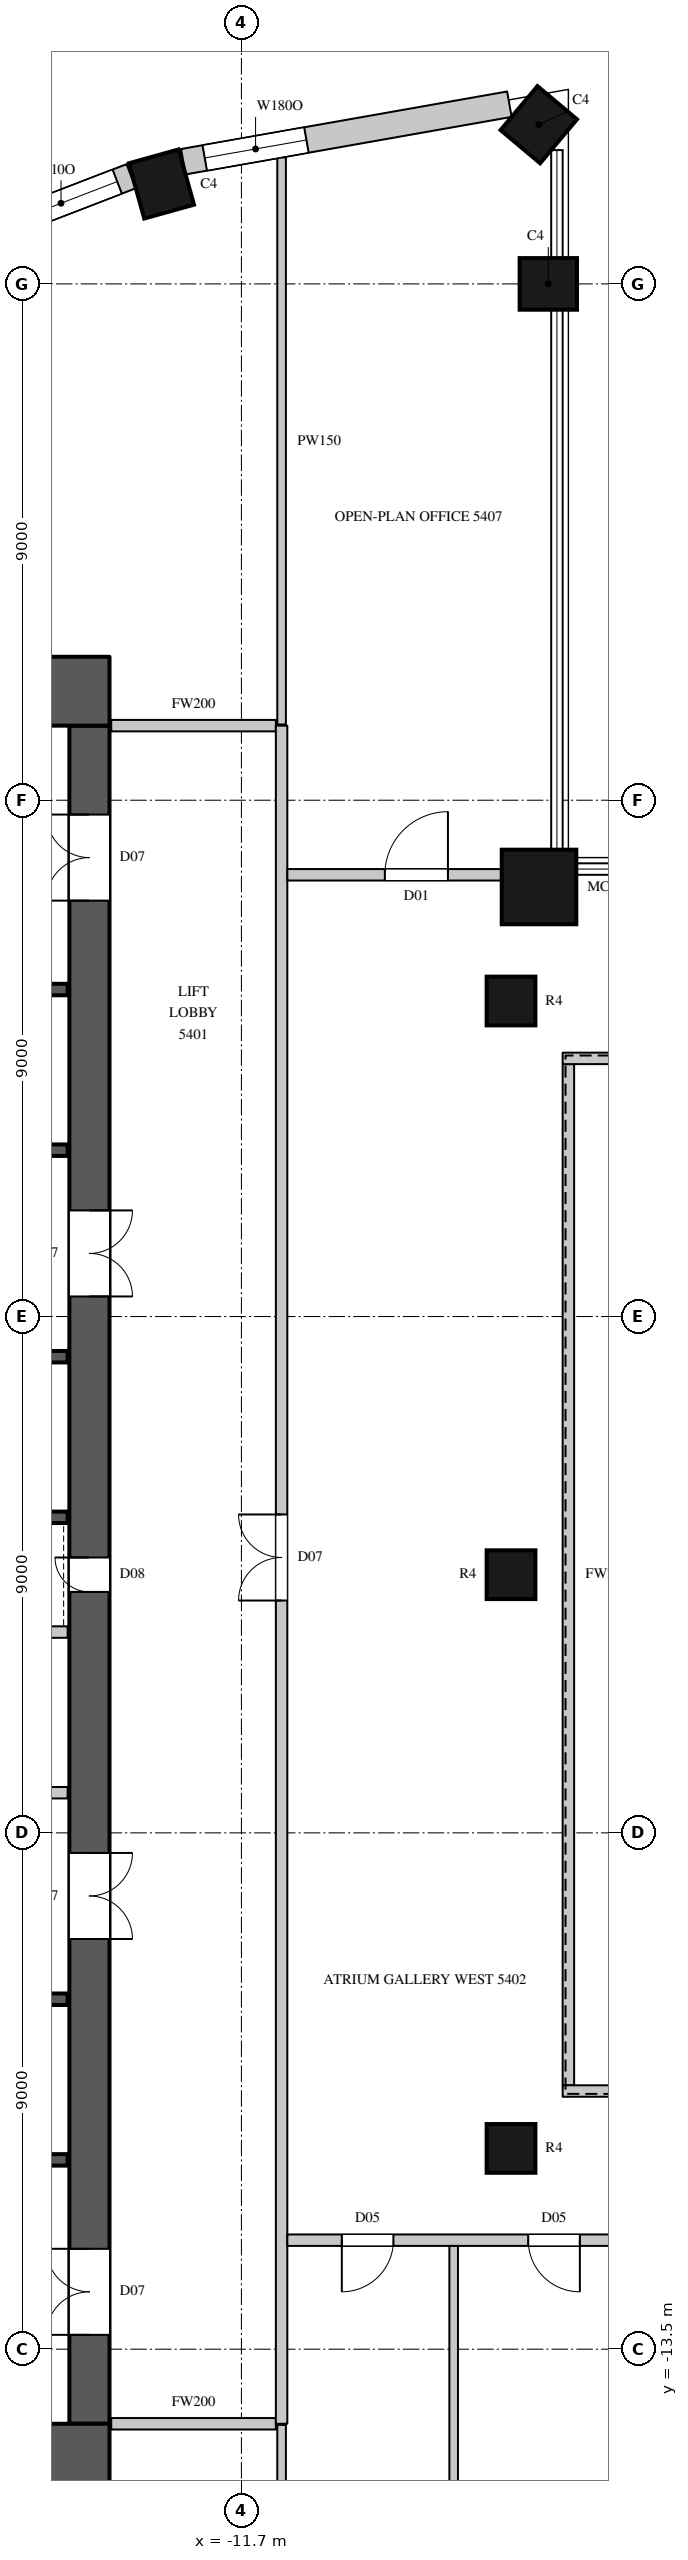
"""IFC4 building model, lengths in metres.
Left out: names, types, materials, properties, quantities, classifications, styles, units other than length and angle.
Written with IfcOpenShell. Run it as: python <this file> out.ifc"""

import sys

from ifc_helpers import new_model, si_unit, direction, frame, frame_2d, origin, origin_2d, place, context, subcontext, project, spatial, rectangle, circle, extrude, element, fill, save


model = new_model("IFC4")
c1 = context("Model", 3, precision=1e-05, world=origin(), true_north=direction((0.0, 1.0)))
c2 = subcontext(c1, "Body", "Model", "MODEL_VIEW")
j1 = project(units=[si_unit("LENGTHUNIT", "METRE"), si_unit("PLANEANGLEUNIT", "RADIAN")], contexts=[c1])
p1 = place(None, origin())
s1 = spatial("IfcSite", under=j1, at=p1, CompositionType="ELEMENT")
p2 = place(p1, origin())
s2 = spatial("IfcBuilding", under=s1, at=p2, CompositionType="ELEMENT")
p3 = place(p2, frame((0.0, 0.0, 243.4)))
s3 = spatial("IfcBuildingStorey", under=s2, at=p3, CompositionType="ELEMENT", Elevation=243.4)
p4 = place(p3, frame((-6.512, 11.988, 0.0), z_axis=(0.0, 0.0, 1.0), x_axis=(1.0, 0.0, 0.0)))
e1 = element("IfcColumn", 1, at=p4, inside=s3, PredefinedType="COLUMN", context=c2, shape_type="SweptSolid", body=[
    extrude(circle(Radius=0.65, at=origin_2d()), origin(), (0.0, 0.0, 1.0), 4.1),
])
for number, where, z_axis, x_axis in (
    (2, (-6.35, 22.5, 0.0), (0.0, 0.0, 1.0), (0.0, 1.0, 0.0)),
    (3, (-6.516, 25.275, 0.0), (0.0, 0.0, 1.0), (-0.766, 0.643, 0.0)),
    (4, (-13.095, 24.241, 0.0), (0.0, 0.0, 1.0), (-0.963, -0.268, 0.0)),
):
    element("IfcColumn", number, at=place(p3, frame(where, z_axis=z_axis, x_axis=x_axis)), inside=s3, PredefinedType="COLUMN", context=c2, shape_type="SweptSolid", body=[
        extrude(rectangle(XDim=0.9, YDim=1.0, at=origin_2d()), origin(), (0.0, 0.0, 1.0), 4.1),
    ])
for number, where, z_axis, x_axis in (
    (5, (-7.0, -10.0, 0.0), (0.0, 0.0, 1.0), (1.0, 0.0, 0.0)),
    (6, (-7.0, 0.0, 0.0), (0.0, 0.0, 1.0), (1.0, 0.0, 0.0)),
    (7, (-7.0, 10.0, 0.0), (0.0, 0.0, 1.0), (1.0, 0.0, 0.0)),
):
    element("IfcColumn", number, at=place(p3, frame(where, z_axis=z_axis, x_axis=x_axis)), inside=s3, PredefinedType="COLUMN", context=c2, shape_type="SweptSolid", body=[
        extrude(circle(Radius=0.425, at=origin_2d()), origin(), (0.0, 0.0, 1.0), 4.1),
    ])
p5 = place(p3, frame((-7.029, 25.632, 0.0), z_axis=(0.0, 0.0, 1.0), x_axis=(-0.984797606634, -0.173705710808, 0.0)))
e8 = element("IfcWall", 8, at=p5, inside=s3, PredefinedType="SOLIDWALL", context=c2, shape_type="SweptSolid", body=[
    extrude(rectangle(XDim=5.772, YDim=0.45, at=frame_2d((2.886, 0.0))), origin(), (0.0, 0.0, 1.0), 3.8),
])
p6 = place(p5, frame((3.593, 0.0, 1.05)))
e9 = element("IfcOpeningElement", 9, at=p6, cuts=e8, PredefinedType="OPENING", context=c2, shape_type="SweptSolid", body=[
    extrude(rectangle(XDim=1.8, YDim=2.4, at=frame_2d((0.9, 1.2))), frame((0.0, 0.235, 0.0), z_axis=(0.0, -1.0, 0.0), x_axis=(1.0, 0.0, 0.0)), (0.0, 0.0, 1.0), 0.47),
])
p7 = place(p3, frame((-13.622, 24.377, 0.0), z_axis=(0.0, 0.0, 1.0), x_axis=(-0.933129259679, -0.359541075164, 0.0)))
e10 = element("IfcWall", 10, at=p7, inside=s3, PredefinedType="SOLIDWALL", context=c2, shape_type="SweptSolid", body=[
    extrude(rectangle(XDim=6.054, YDim=0.45, at=frame_2d((3.027, 0.0))), origin(), (0.0, 0.0, 1.0), 3.8),
])
p8 = place(p7, frame((0.261, 0.0, 1.05)))
e11 = element("IfcOpeningElement", 11, at=p8, cuts=e10, PredefinedType="OPENING", context=c2, shape_type="SweptSolid", body=[
    extrude(rectangle(XDim=2.1, YDim=2.4, at=frame_2d((1.05, 1.2))), frame((0.0, 0.235, 0.0), z_axis=(0.0, -1.0, 0.0), x_axis=(1.0, 0.0, 0.0)), (0.0, 0.0, 1.0), 0.47),
])
for number, where, z_axis, x_axis in (
    (12, (-30.0, 15.4, 0.0), (0.0, 0.0, 1.0), (1.0, 0.0, 0.0)),
    (13, (-30.0, -15.4, 0.0), (0.0, 0.0, 1.0), (1.0, 0.0, 0.0)),
):
    element("IfcWall", number, at=place(p3, frame(where, z_axis=z_axis, x_axis=x_axis)), inside=s3, PredefinedType="SHEAR", context=c2, shape_type="SweptSolid", body=[
        extrude(rectangle(XDim=16.0, YDim=1.2, at=frame_2d((8.0, 0.0))), origin(), (0.0, 0.0, 1.0), 4.1),
    ])
p9 = place(p3, frame((-14.35, -14.8, 0.0), z_axis=(0.0, 0.0, 1.0), x_axis=(0.0, 1.0, 0.0)))
e14 = element("IfcWall", 14, at=p9, inside=s3, PredefinedType="SHEAR", context=c2, shape_type="SweptSolid", body=[
    extrude(rectangle(XDim=29.6, YDim=0.7, at=frame_2d((14.8, 0.0))), origin(), (0.0, 0.0, 1.0), 4.1),
])
p10 = place(p9, frame((1.55, 0.0, 0.0)))
e15 = element("IfcOpeningElement", 15, at=p10, cuts=e14, PredefinedType="OPENING", context=c2, shape_type="SweptSolid", body=[
    extrude(rectangle(XDim=1.5, YDim=2.4, at=frame_2d((0.75, 1.2))), frame((0.0, 0.36, 0.0), z_axis=(0.0, -1.0, 0.0), x_axis=(1.0, 0.0, 0.0)), (0.0, 0.0, 1.0), 0.72),
])
p11 = place(p9, frame((26.55, 0.0, 0.0)))
e16 = element("IfcOpeningElement", 16, at=p11, cuts=e14, PredefinedType="OPENING", context=c2, shape_type="SweptSolid", body=[
    extrude(rectangle(XDim=1.5, YDim=2.4, at=frame_2d((0.75, 1.2))), frame((0.0, 0.36, 0.0), z_axis=(0.0, -1.0, 0.0), x_axis=(1.0, 0.0, 0.0)), (0.0, 0.0, 1.0), 0.72),
])
p12 = place(p9, frame((8.45, 0.0, 0.0)))
e17 = element("IfcOpeningElement", 17, at=p12, cuts=e14, PredefinedType="OPENING", context=c2, shape_type="SweptSolid", body=[
    extrude(rectangle(XDim=1.5, YDim=2.4, at=frame_2d((0.75, 1.2))), frame((0.0, 0.36, 0.0), z_axis=(0.0, -1.0, 0.0), x_axis=(1.0, 0.0, 0.0)), (0.0, 0.0, 1.0), 0.72),
])
p13 = place(p9, frame((19.65, 0.0, 0.0)))
e18 = element("IfcOpeningElement", 18, at=p13, cuts=e14, PredefinedType="OPENING", context=c2, shape_type="SweptSolid", body=[
    extrude(rectangle(XDim=1.5, YDim=2.4, at=frame_2d((0.75, 1.2))), frame((0.0, 0.36, 0.0), z_axis=(0.0, -1.0, 0.0), x_axis=(1.0, 0.0, 0.0)), (0.0, 0.0, 1.0), 0.72),
])
p14 = place(p9, frame((14.5, 0.0, 0.0)))
e19 = element("IfcOpeningElement", 19, at=p14, cuts=e14, PredefinedType="OPENING", context=c2, shape_type="SweptSolid", body=[
    extrude(rectangle(XDim=0.6, YDim=2.0, at=frame_2d((0.3, 1.0))), frame((0.0, 0.36, 0.0), z_axis=(0.0, -1.0, 0.0), x_axis=(1.0, 0.0, 0.0)), (0.0, 0.0, 1.0), 0.72),
])
p15 = place(p3, frame((-21.38, -3.8, 0.0), z_axis=(0.0, 0.0, 1.0), x_axis=(1.0, 0.0, 0.0)))
e20 = element("IfcWall", 20, at=p15, inside=s3, PredefinedType="PARTITIONING", context=c2, shape_type="SweptSolid", body=[
    extrude(rectangle(XDim=6.65, YDim=0.2, at=frame_2d((3.325, 0.0))), origin(), (0.0, 0.0, 1.0), 3.8),
])
p16 = place(p15, frame((2.9, 0.0, 0.0)))
e21 = element("IfcOpeningElement", 21, at=p16, cuts=e20, PredefinedType="OPENING", context=c2, shape_type="SweptSolid", body=[
    extrude(rectangle(XDim=0.9, YDim=2.2, at=frame_2d((0.45, 1.1))), frame((0.0, 0.11, 0.0), z_axis=(0.0, -1.0, 0.0), x_axis=(1.0, 0.0, 0.0)), (0.0, 0.0, 1.0), 0.22),
])
for number, where, z_axis, x_axis in (
    (22, (-13.97, -14.8, 0.0), (0.0, 0.0, 1.0), (1.0, 0.0, 0.0)),
    (23, (-13.97, 14.8, 0.0), (0.0, 0.0, 1.0), (1.0, 0.0, 0.0)),
):
    element("IfcWall", number, at=place(p3, frame(where, z_axis=z_axis, x_axis=x_axis)), inside=s3, PredefinedType="PARTITIONING", context=c2, shape_type="SweptSolid", body=[
        extrude(rectangle(XDim=2.87, YDim=0.2, at=frame_2d((1.435, 0.0))), origin(), (0.0, 0.0, 1.0), 3.8),
    ])
p17 = place(p3, frame((-11.0, -14.8, 0.0), z_axis=(0.0, 0.0, 1.0), x_axis=(0.0, 1.0, 0.0)))
e24 = element("IfcWall", 24, at=p17, inside=s3, PredefinedType="PARTITIONING", context=c2, shape_type="SweptSolid", body=[
    extrude(rectangle(XDim=29.6, YDim=0.2, at=frame_2d((14.8, 0.0))), origin(), (0.0, 0.0, 1.0), 3.8),
])
p18 = place(p17, frame((14.35, 0.0, 0.0)))
e25 = element("IfcOpeningElement", 25, at=p18, cuts=e24, PredefinedType="OPENING", context=c2, shape_type="SweptSolid", body=[
    extrude(rectangle(XDim=1.5, YDim=2.4, at=frame_2d((0.75, 1.2))), frame((0.0, 0.11, 0.0), z_axis=(0.0, -1.0, 0.0), x_axis=(1.0, 0.0, 0.0)), (0.0, 0.0, 1.0), 0.22),
])
p19 = place(p3, frame((-10.9, -11.6, 0.0), z_axis=(0.0, 0.0, 1.0), x_axis=(1.0, 0.0, 0.0)))
e26 = element("IfcWall", 26, at=p19, inside=s3, PredefinedType="PARTITIONING", context=c2, shape_type="SweptSolid", body=[
    extrude(rectangle(XDim=21.4, YDim=0.2, at=frame_2d((10.7, 0.0))), origin(), (0.0, 0.0, 1.0), 3.8),
])
p20 = place(p19, frame((0.95, 0.0, 0.0)))
e27 = element("IfcOpeningElement", 27, at=p20, cuts=e26, PredefinedType="OPENING", context=c2, shape_type="SweptSolid", body=[
    extrude(rectangle(XDim=0.9, YDim=2.2, at=frame_2d((0.45, 1.1))), frame((0.0, 0.11, 0.0), z_axis=(0.0, -1.0, 0.0), x_axis=(1.0, 0.0, 0.0)), (0.0, 0.0, 1.0), 0.22),
])
p21 = place(p19, frame((4.2, 0.0, 0.0)))
e28 = element("IfcOpeningElement", 28, at=p21, cuts=e26, PredefinedType="OPENING", context=c2, shape_type="SweptSolid", body=[
    extrude(rectangle(XDim=0.9, YDim=2.2, at=frame_2d((0.45, 1.1))), frame((0.0, 0.11, 0.0), z_axis=(0.0, -1.0, 0.0), x_axis=(1.0, 0.0, 0.0)), (0.0, 0.0, 1.0), 0.22),
])
p22 = place(p19, frame((6.85, 0.0, 0.0)))
e29 = element("IfcOpeningElement", 29, at=p22, cuts=e26, PredefinedType="OPENING", context=c2, shape_type="SweptSolid", body=[
    extrude(rectangle(XDim=1.1, YDim=2.4, at=frame_2d((0.55, 1.2))), frame((0.0, 0.11, 0.0), z_axis=(0.0, -1.0, 0.0), x_axis=(1.0, 0.0, 0.0)), (0.0, 0.0, 1.0), 0.22),
])
p23 = place(p19, frame((9.8, 0.0, 0.0)))
e30 = element("IfcOpeningElement", 30, at=p23, cuts=e26, PredefinedType="OPENING", context=c2, shape_type="SweptSolid", body=[
    extrude(rectangle(XDim=1.1, YDim=2.4, at=frame_2d((0.55, 1.2))), frame((0.0, 0.11, 0.0), z_axis=(0.0, -1.0, 0.0), x_axis=(1.0, 0.0, 0.0)), (0.0, 0.0, 1.0), 0.22),
])
p24 = place(p3, frame((-10.9, 12.2, 0.0), z_axis=(0.0, 0.0, 1.0), x_axis=(1.0, 0.0, 0.0)))
e31 = element("IfcWall", 31, at=p24, inside=s3, PredefinedType="PARTITIONING", context=c2, shape_type="SweptSolid", body=[
    extrude(rectangle(XDim=3.756, YDim=0.2, at=frame_2d((1.878, 0.0))), origin(), (0.0, 0.0, 1.0), 3.8),
])
p25 = place(p24, frame((1.7, 0.0, 0.0)))
e32 = element("IfcOpeningElement", 32, at=p25, cuts=e31, PredefinedType="OPENING", context=c2, shape_type="SweptSolid", body=[
    extrude(rectangle(XDim=1.1, YDim=2.4, at=frame_2d((0.55, 1.2))), frame((0.0, 0.11, 0.0), z_axis=(0.0, -1.0, 0.0), x_axis=(1.0, 0.0, 0.0)), (0.0, 0.0, 1.0), 0.22),
])
p26 = place(p3, frame((-6.0, -8.9, 0.0), z_axis=(0.0, 0.0, 1.0), x_axis=(0.0, 1.0, 0.0)))
e33 = element("IfcWall", 33, at=p26, inside=s3, PredefinedType="PARTITIONING", context=c2, shape_type="SweptSolid", body=[
    extrude(rectangle(XDim=17.8, YDim=0.2, at=frame_2d((8.9, 0.0))), origin(), (0.0, 0.0, 1.0), 3.8),
])
for number, where, z_axis, x_axis in (
    (34, (-6.1, -9.0, 0.0), (0.0, 0.0, 1.0), (1.0, 0.0, 0.0)),
    (35, (-6.1, 9.0, 0.0), (0.0, 0.0, 1.0), (1.0, 0.0, 0.0)),
):
    element("IfcWall", number, at=place(p3, frame(where, z_axis=z_axis, x_axis=x_axis)), inside=s3, PredefinedType="PARTITIONING", context=c2, shape_type="SweptSolid", body=[
        extrude(rectangle(XDim=7.08, YDim=0.2, at=frame_2d((3.54, 0.0))), origin(), (0.0, 0.0, 1.0), 3.8),
    ])
p27 = place(p3, frame((-11.0, -23.757, 0.0), z_axis=(0.0, 0.0, 1.0), x_axis=(0.0, 1.0, 0.0)))
e36 = element("IfcWall", 36, at=p27, inside=s3, PredefinedType="PARTITIONING", context=c2, shape_type="SweptSolid", body=[
    extrude(rectangle(XDim=8.937, YDim=0.15, at=frame_2d((4.468, 0.0))), origin(), (0.0, 0.0, 1.0), 3.8),
])
p28 = place(p3, frame((-11.0, 14.82, 0.0), z_axis=(0.0, 0.0, 1.0), x_axis=(0.0, 1.0, 0.0)))
e37 = element("IfcWall", 37, at=p28, inside=s3, PredefinedType="PARTITIONING", context=c2, shape_type="SweptSolid", body=[
    extrude(rectangle(XDim=9.883, YDim=0.15, at=frame_2d((4.942, 0.0))), origin(), (0.0, 0.0, 1.0), 3.8),
])
p29 = place(p3, frame((-8.0, -24.04, 0.0), z_axis=(0.0, 0.0, 1.0), x_axis=(0.0, 1.0, 0.0)))
e38 = element("IfcWall", 38, at=p29, inside=s3, PredefinedType="PARTITIONING", context=c2, shape_type="SweptSolid", body=[
    extrude(rectangle(XDim=12.34, YDim=0.15, at=frame_2d((6.17, 0.0))), origin(), (0.0, 0.0, 1.0), 3.8),
])
p30 = place(p3, frame((-29.27, -1.0, 0.0), z_axis=(0.0, 0.0, 1.0), x_axis=(1.0, 0.0, 0.0)))
e39 = element("IfcWall", 39, at=p30, inside=s3, PredefinedType="PARTITIONING", context=c2, shape_type="SweptSolid", body=[
    extrude(rectangle(XDim=14.54, YDim=0.2, at=frame_2d((7.27, 0.0))), origin(), (0.0, 0.0, 1.0), 3.8),
])
p31 = place(p3, frame((-17.92, -10.2, 0.0), z_axis=(0.0, 0.0, 1.0), x_axis=(1.0, 0.0, 0.0)))
e40 = element("IfcWall", 40, at=p31, inside=s3, PredefinedType="SHEAR", context=c2, shape_type="SweptSolid", body=[
    extrude(rectangle(XDim=3.19, YDim=0.2, at=frame_2d((1.595, 0.0))), origin(), (0.0, 0.0, 1.0), 3.8),
])
p32 = place(p31, frame((1.05, 0.0, 0.0)))
e41 = element("IfcOpeningElement", 41, at=p32, cuts=e40, PredefinedType="OPENING", context=c2, shape_type="SweptSolid", body=[
    extrude(rectangle(XDim=1.1, YDim=2.2, at=frame_2d((0.55, 1.1))), frame((0.0, 0.11, 0.0), z_axis=(0.0, -1.0, 0.0), x_axis=(1.0, 0.0, 0.0)), (0.0, 0.0, 1.0), 0.22),
])
for number, where, z_axis, x_axis in (
    (42, (-17.9, -7.4, 0.0), (0.0, 0.0, 1.0), (1.0, 0.0, 0.0)),
    (43, (-17.9, 1.0, 0.0), (0.0, 0.0, 1.0), (1.0, 0.0, 0.0)),
):
    element("IfcWall", number, at=place(p3, frame(where, z_axis=z_axis, x_axis=x_axis)), inside=s3, PredefinedType="SHEAR", context=c2, shape_type="SweptSolid", body=[
        extrude(rectangle(XDim=3.17, YDim=0.2, at=frame_2d((1.585, 0.0))), origin(), (0.0, 0.0, 1.0), 3.8),
    ])
p33 = place(p3, frame((-17.9, 3.8, 0.0), z_axis=(0.0, 0.0, 1.0), x_axis=(1.0, 0.0, 0.0)))
e44 = element("IfcWall", 44, at=p33, inside=s3, PredefinedType="SHEAR", context=c2, shape_type="SweptSolid", body=[
    extrude(rectangle(XDim=3.17, YDim=0.2, at=frame_2d((1.585, 0.0))), origin(), (0.0, 0.0, 1.0), 3.8),
])
p34 = place(p33, frame((1.05, 0.0, 0.0)))
e45 = element("IfcOpeningElement", 45, at=p34, cuts=e44, PredefinedType="OPENING", context=c2, shape_type="SweptSolid", body=[
    extrude(rectangle(XDim=1.1, YDim=2.2, at=frame_2d((0.55, 1.1))), frame((0.0, 0.11, 0.0), z_axis=(0.0, -1.0, 0.0), x_axis=(1.0, 0.0, 0.0)), (0.0, 0.0, 1.0), 0.22),
])
p35 = place(p3, frame((-17.92, 7.4, 0.0), z_axis=(0.0, 0.0, 1.0), x_axis=(1.0, 0.0, 0.0)))
e46 = element("IfcWall", 46, at=p35, inside=s3, PredefinedType="SHEAR", context=c2, shape_type="SweptSolid", body=[
    extrude(rectangle(XDim=3.19, YDim=0.2, at=frame_2d((1.595, 0.0))), origin(), (0.0, 0.0, 1.0), 3.8),
])
p36 = place(p3, frame((-17.92, 10.2, 0.0), z_axis=(0.0, 0.0, 1.0), x_axis=(1.0, 0.0, 0.0)))
e47 = element("IfcWall", 47, at=p36, inside=s3, PredefinedType="SHEAR", context=c2, shape_type="SweptSolid", body=[
    extrude(rectangle(XDim=3.19, YDim=0.2, at=frame_2d((1.595, 0.0))), origin(), (0.0, 0.0, 1.0), 3.8),
])
p37 = place(p36, frame((1.05, 0.0, 0.0)))
e48 = element("IfcOpeningElement", 48, at=p37, cuts=e47, PredefinedType="OPENING", context=c2, shape_type="SweptSolid", body=[
    extrude(rectangle(XDim=1.1, YDim=2.2, at=frame_2d((0.55, 1.1))), frame((0.0, 0.11, 0.0), z_axis=(0.0, -1.0, 0.0), x_axis=(1.0, 0.0, 0.0)), (0.0, 0.0, 1.0), 0.22),
])
p38 = place(p6, origin())
e49 = element("IfcWindow", 49, at=p38, inside=s3, PartitioningType="SINGLE_PANEL", PredefinedType="WINDOW", context=c2, shape_type="SweptSolid", body=[
    extrude(rectangle(XDim=1.8, YDim=2.4, at=frame_2d((0.9, 1.2))), frame((0.0, 0.135, 0.0), z_axis=(0.0, -1.0, 0.0), x_axis=(1.0, 0.0, 0.0)), (0.0, 0.0, 1.0), 0.06),
])
fill(e9, e49)
p39 = place(p8, origin())
e50 = element("IfcWindow", 50, at=p39, inside=s3, PartitioningType="SINGLE_PANEL", PredefinedType="WINDOW", context=c2, shape_type="SweptSolid", body=[
    extrude(rectangle(XDim=2.1, YDim=2.4, at=frame_2d((1.05, 1.2))), frame((0.0, 0.135, 0.0), z_axis=(0.0, -1.0, 0.0), x_axis=(1.0, 0.0, 0.0)), (0.0, 0.0, 1.0), 0.06),
])
fill(e11, e50)
p40 = place(p18, origin())
e51 = element("IfcDoor", 51, at=p40, inside=s3, OperationType="DOUBLE_DOOR_SINGLE_SWING", PredefinedType="DOOR", context=c2, shape_type="SweptSolid", body=[
    extrude(rectangle(XDim=1.5, YDim=2.4, at=frame_2d((0.75, 1.2))), frame((0.0, 0.025, 0.0), z_axis=(0.0, -1.0, 0.0), x_axis=(1.0, 0.0, 0.0)), (0.0, 0.0, 1.0), 0.05),
])
fill(e25, e51)
p41 = place(p20, origin())
e52 = element("IfcDoor", 52, at=p41, inside=s3, OperationType="SINGLE_SWING_RIGHT", PredefinedType="DOOR", context=c2, shape_type="SweptSolid", body=[
    extrude(rectangle(XDim=0.9, YDim=2.2, at=frame_2d((0.45, 1.1))), frame((0.0, 0.025, 0.0), z_axis=(0.0, -1.0, 0.0), x_axis=(1.0, 0.0, 0.0)), (0.0, 0.0, 1.0), 0.05),
])
fill(e27, e52)
p42 = place(p21, origin())
e53 = element("IfcDoor", 53, at=p42, inside=s3, OperationType="SINGLE_SWING_LEFT", PredefinedType="DOOR", context=c2, shape_type="SweptSolid", body=[
    extrude(rectangle(XDim=0.9, YDim=2.2, at=frame_2d((0.45, 1.1))), frame((0.0, 0.025, 0.0), z_axis=(0.0, -1.0, 0.0), x_axis=(1.0, 0.0, 0.0)), (0.0, 0.0, 1.0), 0.05),
])
fill(e28, e53)
p43 = place(p25, origin())
e54 = element("IfcDoor", 54, at=p43, inside=s3, OperationType="SINGLE_SWING_RIGHT", PredefinedType="DOOR", context=c2, shape_type="SweptSolid", body=[
    extrude(rectangle(XDim=1.1, YDim=2.4, at=frame_2d((0.55, 1.2))), frame((0.0, 0.025, 0.0), z_axis=(0.0, -1.0, 0.0), x_axis=(1.0, 0.0, 0.0)), (0.0, 0.0, 1.0), 0.05),
])
fill(e32, e54)
p44 = place(p10, origin())
e55 = element("IfcDoor", 55, at=p44, inside=s3, OperationType="DOUBLE_DOOR_SINGLE_SWING", PredefinedType="DOOR", context=c2, shape_type="SweptSolid", body=[
    extrude(rectangle(XDim=1.5, YDim=2.4, at=frame_2d((0.75, 1.2))), frame((0.0, 0.345, 0.0), z_axis=(0.0, -1.0, 0.0), x_axis=(1.0, 0.0, 0.0)), (0.0, 0.0, 1.0), 0.05),
])
fill(e15, e55)
p45 = place(p11, origin())
e56 = element("IfcDoor", 56, at=p45, inside=s3, OperationType="DOUBLE_DOOR_SINGLE_SWING", PredefinedType="DOOR", context=c2, shape_type="SweptSolid", body=[
    extrude(rectangle(XDim=1.5, YDim=2.4, at=frame_2d((0.75, 1.2))), frame((0.0, 0.345, 0.0), z_axis=(0.0, -1.0, 0.0), x_axis=(1.0, 0.0, 0.0)), (0.0, 0.0, 1.0), 0.05),
])
fill(e16, e56)
p46 = place(p12, origin())
e57 = element("IfcDoor", 57, at=p46, inside=s3, OperationType="DOUBLE_DOOR_SINGLE_SWING", PredefinedType="DOOR", context=c2, shape_type="SweptSolid", body=[
    extrude(rectangle(XDim=1.5, YDim=2.4, at=frame_2d((0.75, 1.2))), frame((0.0, -0.295, 0.0), z_axis=(0.0, -1.0, 0.0), x_axis=(1.0, 0.0, 0.0)), (0.0, 0.0, 1.0), 0.05),
])
fill(e17, e57)
p47 = place(p13, origin())
e58 = element("IfcDoor", 58, at=p47, inside=s3, OperationType="DOUBLE_DOOR_SINGLE_SWING", PredefinedType="DOOR", context=c2, shape_type="SweptSolid", body=[
    extrude(rectangle(XDim=1.5, YDim=2.4, at=frame_2d((0.75, 1.2))), frame((0.0, -0.295, 0.0), z_axis=(0.0, -1.0, 0.0), x_axis=(1.0, 0.0, 0.0)), (0.0, 0.0, 1.0), 0.05),
])
fill(e18, e58)
p48 = place(p14, origin())
e59 = element("IfcDoor", 59, at=p48, inside=s3, OperationType="SINGLE_SWING_RIGHT", PredefinedType="DOOR", context=c2, shape_type="SweptSolid", body=[
    extrude(rectangle(XDim=0.6, YDim=2.0, at=frame_2d((0.3, 1.0))), frame((0.0, 0.345, 0.0), z_axis=(0.0, -1.0, 0.0), x_axis=(1.0, 0.0, 0.0)), (0.0, 0.0, 1.0), 0.05),
])
fill(e19, e59)
save(model, sys.argv[1])
